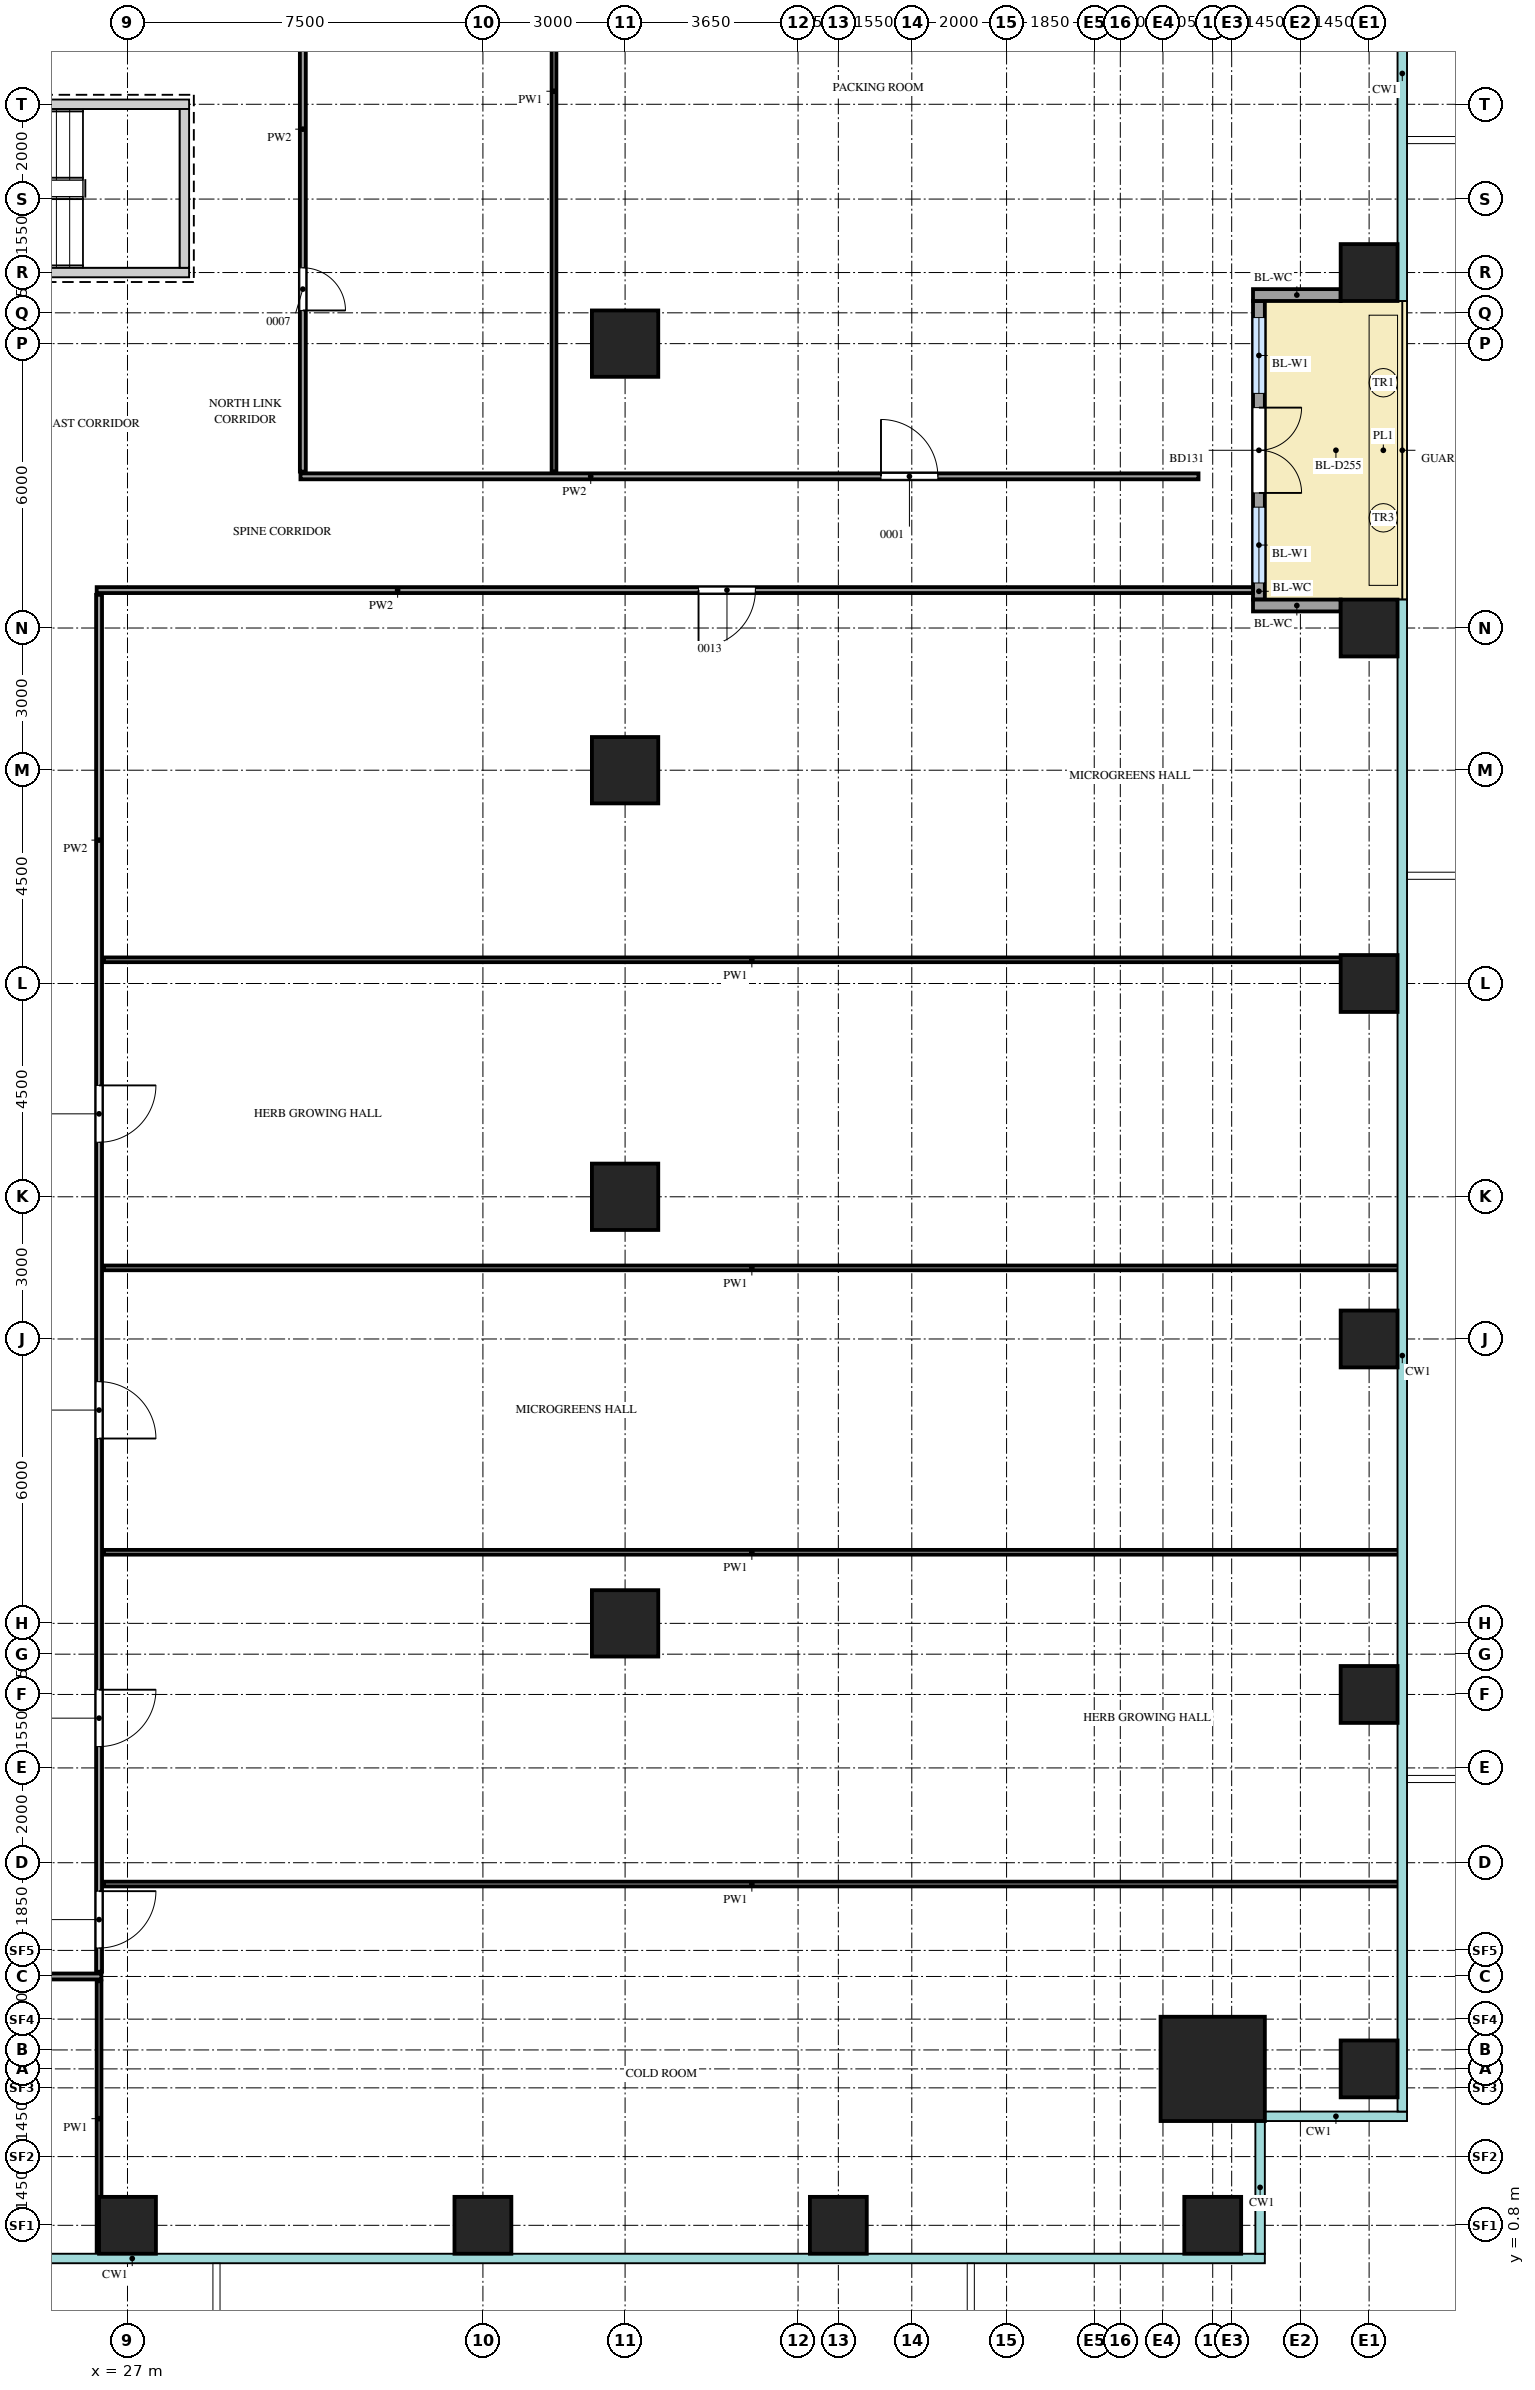
"""IFC4 building model, lengths in metres.
Left out: names, types, materials, properties, quantities, classifications, styles, units other than length and angle.
Written with IfcOpenShell. Run it as: python <this file> out.ifc"""

import sys

from ifc_helpers import new_model, si_unit, direction, frame, frame_2d, origin, origin_2d, place, context, subcontext, project, spatial, rectangle, extrude, source, transform, mapped, element, fill, save


model = new_model("IFC4")
c1 = context("Model", 3, precision=1e-05, world=origin(), true_north=direction((0.0, 1.0)))
c2 = subcontext(c1, "Body", "Model", "MODEL_VIEW")
j1 = project(units=[si_unit("LENGTHUNIT", "METRE"), si_unit("PLANEANGLEUNIT", "RADIAN")], contexts=[c1])
p1 = place(None, origin())
s1 = spatial("IfcSite", under=j1, at=p1, CompositionType="ELEMENT")
p2 = place(p1, origin())
s2 = spatial("IfcBuilding", under=s1, at=p2, CompositionType="ELEMENT")
p3 = place(p2, frame((0.0, 0.0, 64.5)))
s3 = spatial("IfcBuildingStorey", under=s2, at=p3, CompositionType="ELEMENT", Elevation=64.5)
m1 = source(origin(), c2, "Body", "SweptSolid", [
    extrude(rectangle(XDim=7.1, YDim=0.2, at=frame_2d((3.55, 0.0))), origin(), (0.0, 0.0, 1.0), 4.2),
])
p4 = place(p3, frame((21.2, 45.55, 0.0), z_axis=(0.0, 0.0, 1.0), x_axis=(1.0, 0.0, 0.0)))
e1 = element("IfcWall", 1, at=p4, inside=s3, PredefinedType="SHEAR", context=c2, shape_type="MappedRepresentation", body=[
    mapped(m1, transform((0.0, 0.0, 0.0))),
])
m2 = source(origin(), c2, "Body", "SweptSolid", [
    extrude(rectangle(XDim=1.2, YDim=2.1, at=frame_2d((0.6, 1.05))), frame((0.0, 0.11, 0.0), z_axis=(0.0, -1.0, 0.0), x_axis=(1.0, 0.0, 0.0)), (0.0, 0.0, 1.0), 0.22),
])
p5 = place(p4, frame((0.15, 0.0, 0.0)))
e2 = element("IfcOpeningElement", 2, at=p5, cuts=e1, PredefinedType="OPENING", context=c2, shape_type="MappedRepresentation", body=[
    mapped(m2, transform((0.0, 0.0, 0.0))),
])
p6 = place(p3, frame((21.2, 42.0, 0.0), z_axis=(0.0, 0.0, 1.0), x_axis=(1.0, 0.0, 0.0)))
e3 = element("IfcWall", 3, at=p6, inside=s3, PredefinedType="SHEAR", context=c2, shape_type="MappedRepresentation", body=[
    mapped(m1, transform((0.0, 0.0, 0.0))),
])
m3 = source(origin(), c2, "Body", "SweptSolid", [
    extrude(rectangle(XDim=3.35, YDim=0.2, at=frame_2d((1.675, 0.0))), origin(), (0.0, 0.0, 1.0), 4.2),
])
p7 = place(p3, frame((28.2, 42.1, 0.0), z_axis=(0.0, 0.0, 1.0), x_axis=(0.0, 1.0, 0.0)))
e4 = element("IfcWall", 4, at=p7, inside=s3, PredefinedType="SHEAR", context=c2, shape_type="MappedRepresentation", body=[
    mapped(m3, transform((0.0, 0.0, 0.0))),
])
m4 = source(origin(), c2, "Body", "SweptSolid", [
    extrude(rectangle(XDim=2.2, YDim=2.2, at=origin_2d()), origin(), (0.0, 0.0, 1.0), 4.5),
])
p8 = place(p3, frame((49.9, 4.1, 0.0), z_axis=(0.0, 0.0, 1.0), x_axis=(1.0, 0.0, 0.0)))
e5 = element("IfcColumn", 5, at=p8, inside=s3, PredefinedType="COLUMN", context=c2, shape_type="MappedRepresentation", body=[
    mapped(m4, transform((0.0, 0.0, 0.0))),
])
m5 = source(origin(), c2, "Body", "SweptSolid", [
    extrude(rectangle(XDim=1.2, YDim=1.2, at=origin_2d()), origin(), (0.0, 0.0, 1.0), 4.2),
])
for number, where, z_axis, x_axis in (
    (6, (27.0, 0.8, 0.0), (0.0, 0.0, 1.0), (1.0, 0.0, 0.0)),
    (7, (34.5, 0.8, 0.0), (0.0, 0.0, 1.0), (1.0, 0.0, 0.0)),
    (8, (42.0, 0.8, 0.0), (0.0, 0.0, 1.0), (1.0, 0.0, 0.0)),
    (9, (49.9, 0.8, 0.0), (0.0, 0.0, 1.0), (1.0, 0.0, 0.0)),
    (10, (53.2, 4.1, 0.0), (0.0, 0.0, 1.0), (1.0, 0.0, 0.0)),
    (11, (53.2, 12.0, 0.0), (0.0, 0.0, 1.0), (1.0, 0.0, 0.0)),
    (12, (53.2, 19.5, 0.0), (0.0, 0.0, 1.0), (1.0, 0.0, 0.0)),
    (13, (53.2, 27.0, 0.0), (0.0, 0.0, 1.0), (1.0, 0.0, 0.0)),
    (14, (53.2, 34.5, 0.0), (0.0, 0.0, 1.0), (1.0, 0.0, 0.0)),
    (15, (53.2, 42.0, 0.0), (0.0, 0.0, 1.0), (1.0, 0.0, 0.0)),
):
    element("IfcColumn", number, at=place(p3, frame(where, z_axis=z_axis, x_axis=x_axis)), inside=s3, PredefinedType="COLUMN", context=c2, shape_type="MappedRepresentation", body=[
        mapped(m5, transform((0.0, 0.0, 0.0))),
    ])
m6 = source(origin(), c2, "Body", "SweptSolid", [
    extrude(rectangle(XDim=1.4, YDim=1.4, at=origin_2d()), origin(), (0.0, 0.0, 1.0), 4.2),
])
for number, where, z_axis, x_axis in (
    (16, (37.5, 13.5, 0.0), (0.0, 0.0, 1.0), (1.0, 0.0, 0.0)),
    (17, (37.5, 22.5, 0.0), (0.0, 0.0, 1.0), (1.0, 0.0, 0.0)),
    (18, (37.5, 31.5, 0.0), (0.0, 0.0, 1.0), (1.0, 0.0, 0.0)),
    (19, (37.5, 40.5, 0.0), (0.0, 0.0, 1.0), (1.0, 0.0, 0.0)),
):
    element("IfcColumn", number, at=place(p3, frame(where, z_axis=z_axis, x_axis=x_axis)), inside=s3, PredefinedType="COLUMN", context=c2, shape_type="MappedRepresentation", body=[
        mapped(m6, transform((0.0, 0.0, 0.0))),
    ])
m7 = source(origin(), c2, "Body", "SweptSolid", [
    extrude(rectangle(XDim=6.3, YDim=0.25, at=frame_2d((3.15, 0.0))), origin(), (0.0, 0.0, 1.0), 3.6),
])
p9 = place(p3, frame((50.875, 35.1, 0.0), z_axis=(0.0, 0.0, 1.0), x_axis=(0.0, 1.0, 0.0)))
e20 = element("IfcWall", 20, at=p9, inside=s3, PredefinedType="SOLIDWALL", context=c2, shape_type="MappedRepresentation", body=[
    mapped(m7, transform((0.0, 0.0, 0.0))),
])
m8 = source(origin(), c2, "Body", "SweptSolid", [
    extrude(rectangle(XDim=1.6, YDim=2.4, at=frame_2d((0.8, 1.2))), frame((0.0, 0.135, 0.0), z_axis=(0.0, -1.0, 0.0), x_axis=(1.0, 0.0, 0.0)), (0.0, 0.0, 1.0), 0.27),
])
p10 = place(p9, frame((0.35, 0.0, 0.0)))
e21 = element("IfcOpeningElement", 21, at=p10, cuts=e20, PredefinedType="OPENING", context=c2, shape_type="MappedRepresentation", body=[
    mapped(m8, transform((0.0, 0.0, 0.0))),
])
p11 = place(p9, frame((4.35, 0.0, 0.0)))
e22 = element("IfcOpeningElement", 22, at=p11, cuts=e20, PredefinedType="OPENING", context=c2, shape_type="MappedRepresentation", body=[
    mapped(m8, transform((0.0, 0.0, 0.0))),
])
m9 = source(origin(), c2, "Body", "SweptSolid", [
    extrude(rectangle(XDim=1.8, YDim=2.4, at=frame_2d((0.9, 1.2))), frame((0.0, 0.135, 0.0), z_axis=(0.0, -1.0, 0.0), x_axis=(1.0, 0.0, 0.0)), (0.0, 0.0, 1.0), 0.27),
])
p12 = place(p9, frame((2.25, 0.0, 0.0)))
e23 = element("IfcOpeningElement", 23, at=p12, cuts=e20, PredefinedType="OPENING", context=c2, shape_type="MappedRepresentation", body=[
    mapped(m9, transform((0.0, 0.0, 0.0))),
])
m10 = source(origin(), c2, "Body", "SweptSolid", [
    extrude(rectangle(XDim=1.85, YDim=0.25, at=frame_2d((0.925, 0.0))), origin(), (0.0, 0.0, 1.0), 3.6),
])
for number, where, z_axis, x_axis in (
    (24, (52.6, 34.975, 0.0), (0.0, 0.0, 1.0), (-1.0, 0.0, 0.0)),
    (25, (52.6, 41.525, 0.0), (0.0, 0.0, 1.0), (-1.0, 0.0, 0.0)),
):
    element("IfcWall", number, at=place(p3, frame(where, z_axis=z_axis, x_axis=x_axis)), inside=s3, PredefinedType="SOLIDWALL", context=c2, shape_type="MappedRepresentation", body=[
        mapped(m10, transform((0.0, 0.0, 0.0))),
    ])
m11 = source(origin(), c2, "Body", "SweptSolid", [
    extrude(rectangle(XDim=5.8, YDim=0.1, at=frame_2d((2.9, 0.0))), origin(), (0.0, 0.0, 1.0), 4.3),
])
p13 = place(p3, frame((26.4, 0.15, 0.0), z_axis=(0.0, 0.0, 1.0), x_axis=(0.0, 1.0, 0.0)))
e26 = element("IfcWall", 26, at=p13, inside=s3, PredefinedType="PARTITIONING", context=c2, shape_type="MappedRepresentation", body=[
    mapped(m11, transform((0.0, 0.0, 0.0))),
])
m12 = source(origin(), c2, "Body", "SweptSolid", [
    extrude(rectangle(XDim=22.3, YDim=0.125, at=frame_2d((11.15, 0.0))), origin(), (0.0, 0.0, 1.0), 4.3),
])
p14 = place(p3, frame((4.15, 6.05, 0.0), z_axis=(0.0, 0.0, 1.0), x_axis=(1.0, 0.0, 0.0)))
e27 = element("IfcWall", 27, at=p14, inside=s3, PredefinedType="PARTITIONING", context=c2, shape_type="MappedRepresentation", body=[
    mapped(m12, transform((0.0, 0.0, 0.0))),
])
m13 = source(origin(), c2, "Body", "SweptSolid", [
    extrude(rectangle(XDim=0.9, YDim=2.1, at=frame_2d((0.45, 1.05))), frame((0.0, 0.073, 0.0), z_axis=(0.0, -1.0, 0.0), x_axis=(1.0, 0.0, 0.0)), (0.0, 0.0, 1.0), 0.145),
])
p15 = place(p14, frame((3.5, 0.0, 0.0)))
e28 = element("IfcOpeningElement", 28, at=p15, cuts=e27, PredefinedType="OPENING", context=c2, shape_type="MappedRepresentation", body=[
    mapped(m13, transform((0.0, 0.0, 0.0))),
])
m14 = source(origin(), c2, "Body", "SweptSolid", [
    extrude(rectangle(XDim=1.2, YDim=2.1, at=frame_2d((0.6, 1.05))), frame((0.0, 0.073, 0.0), z_axis=(0.0, -1.0, 0.0), x_axis=(1.0, 0.0, 0.0)), (0.0, 0.0, 1.0), 0.145),
])
p16 = place(p14, frame((13.25, 0.0, 0.0)))
e29 = element("IfcOpeningElement", 29, at=p16, cuts=e27, PredefinedType="OPENING", context=c2, shape_type="MappedRepresentation", body=[
    mapped(m14, transform((0.0, 0.0, 0.0))),
])
m15 = source(origin(), c2, "Body", "SweptSolid", [
    extrude(rectangle(XDim=29.05, YDim=0.125, at=frame_2d((14.525, 0.0))), origin(), (0.0, 0.0, 1.0), 4.3),
])
p17 = place(p3, frame((26.4, 6.15, 0.0), z_axis=(0.0, 0.0, 1.0), x_axis=(0.0, 1.0, 0.0)))
e30 = element("IfcWall", 30, at=p17, inside=s3, PredefinedType="PARTITIONING", context=c2, shape_type="MappedRepresentation", body=[
    mapped(m15, transform((0.0, 0.0, 0.0))),
])
p18 = place(p17, frame((0.5, 0.0, 0.0)))
e31 = element("IfcOpeningElement", 31, at=p18, cuts=e30, PredefinedType="OPENING", context=c2, shape_type="MappedRepresentation", body=[
    mapped(m14, transform((0.0, 0.0, 0.0))),
])
p19 = place(p17, frame((4.75, 0.0, 0.0)))
e32 = element("IfcOpeningElement", 32, at=p19, cuts=e30, PredefinedType="OPENING", context=c2, shape_type="MappedRepresentation", body=[
    mapped(m14, transform((0.0, 0.0, 0.0))),
])
p20 = place(p17, frame((11.25, 0.0, 0.0)))
e33 = element("IfcOpeningElement", 33, at=p20, cuts=e30, PredefinedType="OPENING", context=c2, shape_type="MappedRepresentation", body=[
    mapped(m14, transform((0.0, 0.0, 0.0))),
])
p21 = place(p17, frame((17.5, 0.0, 0.0)))
e34 = element("IfcOpeningElement", 34, at=p21, cuts=e30, PredefinedType="OPENING", context=c2, shape_type="MappedRepresentation", body=[
    mapped(m14, transform((0.0, 0.0, 0.0))),
])
m16 = source(origin(), c2, "Body", "SweptSolid", [
    extrude(rectangle(XDim=27.35, YDim=0.1, at=frame_2d((13.675, 0.0))), origin(), (0.0, 0.0, 1.0), 4.3),
])
for number, where, z_axis, x_axis in (
    (35, (26.5, 8.0, 0.0), (0.0, 0.0, 1.0), (1.0, 0.0, 0.0)),
    (36, (26.5, 15.0, 0.0), (0.0, 0.0, 1.0), (1.0, 0.0, 0.0)),
    (37, (26.5, 21.0, 0.0), (0.0, 0.0, 1.0), (1.0, 0.0, 0.0)),
    (38, (26.5, 27.5, 0.0), (0.0, 0.0, 1.0), (1.0, 0.0, 0.0)),
):
    element("IfcWall", number, at=place(p3, frame(where, z_axis=z_axis, x_axis=x_axis)), inside=s3, PredefinedType="PARTITIONING", context=c2, shape_type="MappedRepresentation", body=[
        mapped(m16, transform((0.0, 0.0, 0.0))),
    ])
m17 = source(origin(), c2, "Body", "SweptSolid", [
    extrude(rectangle(XDim=24.4, YDim=0.125, at=frame_2d((12.2, 0.0))), origin(), (0.0, 0.0, 1.0), 4.3),
])
p22 = place(p3, frame((26.35, 35.3, 0.0), z_axis=(0.0, 0.0, 1.0), x_axis=(1.0, 0.0, 0.0)))
e39 = element("IfcWall", 39, at=p22, inside=s3, PredefinedType="PARTITIONING", context=c2, shape_type="MappedRepresentation", body=[
    mapped(m17, transform((0.0, 0.0, 0.0))),
])
p23 = place(p22, frame((12.7, 0.0, 0.0)))
e40 = element("IfcOpeningElement", 40, at=p23, cuts=e39, PredefinedType="OPENING", context=c2, shape_type="MappedRepresentation", body=[
    mapped(m14, transform((0.0, 0.0, 0.0))),
])
m18 = source(origin(), c2, "Body", "SweptSolid", [
    extrude(rectangle(XDim=18.95, YDim=0.125, at=frame_2d((9.475, 0.0))), origin(), (0.0, 0.0, 1.0), 4.3),
])
p24 = place(p3, frame((30.65, 37.7, 0.0), z_axis=(0.0, 0.0, 1.0), x_axis=(1.0, 0.0, 0.0)))
e41 = element("IfcWall", 41, at=p24, inside=s3, PredefinedType="PARTITIONING", context=c2, shape_type="MappedRepresentation", body=[
    mapped(m18, transform((0.0, 0.0, 0.0))),
])
p25 = place(p24, frame((12.25, 0.0, 0.0)))
e42 = element("IfcOpeningElement", 42, at=p25, cuts=e41, PredefinedType="OPENING", context=c2, shape_type="MappedRepresentation", body=[
    mapped(m14, transform((0.0, 0.0, 0.0))),
])
m19 = source(origin(), c2, "Body", "SweptSolid", [
    extrude(rectangle(XDim=10.15, YDim=0.125, at=frame_2d((5.075, 0.0))), origin(), (0.0, 0.0, 1.0), 4.3),
])
p26 = place(p3, frame((30.7, 37.8, 0.0), z_axis=(0.0, 0.0, 1.0), x_axis=(0.0, 1.0, 0.0)))
e43 = element("IfcWall", 43, at=p26, inside=s3, PredefinedType="PARTITIONING", context=c2, shape_type="MappedRepresentation", body=[
    mapped(m19, transform((0.0, 0.0, 0.0))),
])
p27 = place(p26, frame((3.4, 0.0, 0.0)))
e44 = element("IfcOpeningElement", 44, at=p27, cuts=e43, PredefinedType="OPENING", context=c2, shape_type="MappedRepresentation", body=[
    mapped(m13, transform((0.0, 0.0, 0.0))),
])
m20 = source(origin(), c2, "Body", "SweptSolid", [
    extrude(rectangle(XDim=16.05, YDim=0.1, at=frame_2d((8.025, 0.0))), origin(), (0.0, 0.0, 1.0), 4.3),
])
p28 = place(p3, frame((36.0, 37.8, 0.0), z_axis=(0.0, 0.0, 1.0), x_axis=(0.0, 1.0, 0.0)))
e45 = element("IfcWall", 45, at=p28, inside=s3, PredefinedType="PARTITIONING", context=c2, shape_type="MappedRepresentation", body=[
    mapped(m20, transform((0.0, 0.0, 0.0))),
])
m21 = source(origin(), c2, "Body", "SweptSolid", [
    extrude(rectangle(XDim=1.6, YDim=2.4, at=frame_2d((0.8, 1.2))), frame((0.0, 0.03, 0.0), z_axis=(0.0, -1.0, 0.0), x_axis=(1.0, 0.0, 0.0)), (0.0, 0.0, 1.0), 0.06),
])
p29 = place(p10, origin())
e46 = element("IfcWindow", 46, at=p29, inside=s3, PartitioningType="SINGLE_PANEL", PredefinedType="WINDOW", context=c2, shape_type="MappedRepresentation", body=[
    mapped(m21, transform((0.0, 0.0, 0.0))),
])
fill(e21, e46)
p30 = place(p11, origin())
e47 = element("IfcWindow", 47, at=p30, inside=s3, PartitioningType="SINGLE_PANEL", PredefinedType="WINDOW", context=c2, shape_type="MappedRepresentation", body=[
    mapped(m21, transform((0.0, 0.0, 0.0))),
])
fill(e22, e47)
m22 = source(origin(), c2, "Body", "SweptSolid", [
    extrude(rectangle(XDim=1.8, YDim=2.4, at=frame_2d((0.9, 1.2))), frame((0.0, 0.025, 0.0), z_axis=(0.0, -1.0, 0.0), x_axis=(1.0, 0.0, 0.0)), (0.0, 0.0, 1.0), 0.05),
])
p31 = place(p12, origin())
e48 = element("IfcDoor", 48, at=p31, inside=s3, OperationType="DOUBLE_DOOR_DOUBLE_SWING", PredefinedType="DOOR", context=c2, shape_type="MappedRepresentation", body=[
    mapped(m22, transform((0.0, 0.0, 0.0))),
])
fill(e23, e48)
m23 = source(origin(), c2, "Body", "SweptSolid", [
    extrude(rectangle(XDim=1.2, YDim=2.1, at=frame_2d((0.6, 1.05))), frame((0.0, 0.025, 0.0), z_axis=(0.0, -1.0, 0.0), x_axis=(1.0, 0.0, 0.0)), (0.0, 0.0, 1.0), 0.05),
])
p32 = place(p18, origin())
e49 = element("IfcDoor", 49, at=p32, inside=s3, OperationType="SINGLE_SWING_RIGHT", PredefinedType="DOOR", context=c2, shape_type="MappedRepresentation", body=[
    mapped(m23, transform((0.0, 0.0, 0.0))),
])
fill(e31, e49)
p33 = place(p19, origin())
e50 = element("IfcDoor", 50, at=p33, inside=s3, OperationType="SINGLE_SWING_RIGHT", PredefinedType="DOOR", context=c2, shape_type="MappedRepresentation", body=[
    mapped(m23, transform((0.0, 0.0, 0.0))),
])
fill(e32, e50)
p34 = place(p20, origin())
e51 = element("IfcDoor", 51, at=p34, inside=s3, OperationType="SINGLE_SWING_LEFT", PredefinedType="DOOR", context=c2, shape_type="MappedRepresentation", body=[
    mapped(m23, transform((0.0, 0.0, 0.0))),
])
fill(e33, e51)
p35 = place(p21, origin())
e52 = element("IfcDoor", 52, at=p35, inside=s3, OperationType="SINGLE_SWING_RIGHT", PredefinedType="DOOR", context=c2, shape_type="MappedRepresentation", body=[
    mapped(m23, transform((0.0, 0.0, 0.0))),
])
fill(e34, e52)
p36 = place(p23, origin())
e53 = element("IfcDoor", 53, at=p36, inside=s3, OperationType="SINGLE_SWING_LEFT", PredefinedType="DOOR", context=c2, shape_type="MappedRepresentation", body=[
    mapped(m23, transform((0.0, 0.0, 0.0))),
])
fill(e40, e53)
m24 = source(origin(), c2, "Body", "SweptSolid", [
    extrude(rectangle(XDim=0.9, YDim=2.1, at=frame_2d((0.45, 1.05))), frame((0.0, 0.025, 0.0), z_axis=(0.0, -1.0, 0.0), x_axis=(1.0, 0.0, 0.0)), (0.0, 0.0, 1.0), 0.05),
])
p37 = place(p27, origin())
e54 = element("IfcDoor", 54, at=p37, inside=s3, OperationType="SINGLE_SWING_LEFT", PredefinedType="DOOR", context=c2, shape_type="MappedRepresentation", body=[
    mapped(m24, transform((0.0, 0.0, 0.0))),
])
fill(e44, e54)
p38 = place(p25, origin())
e55 = element("IfcDoor", 55, at=p38, inside=s3, OperationType="SINGLE_SWING_RIGHT", PredefinedType="DOOR", context=c2, shape_type="MappedRepresentation", body=[
    mapped(m23, transform((0.0, 0.0, 0.0))),
])
fill(e42, e55)
save(model, sys.argv[1])
